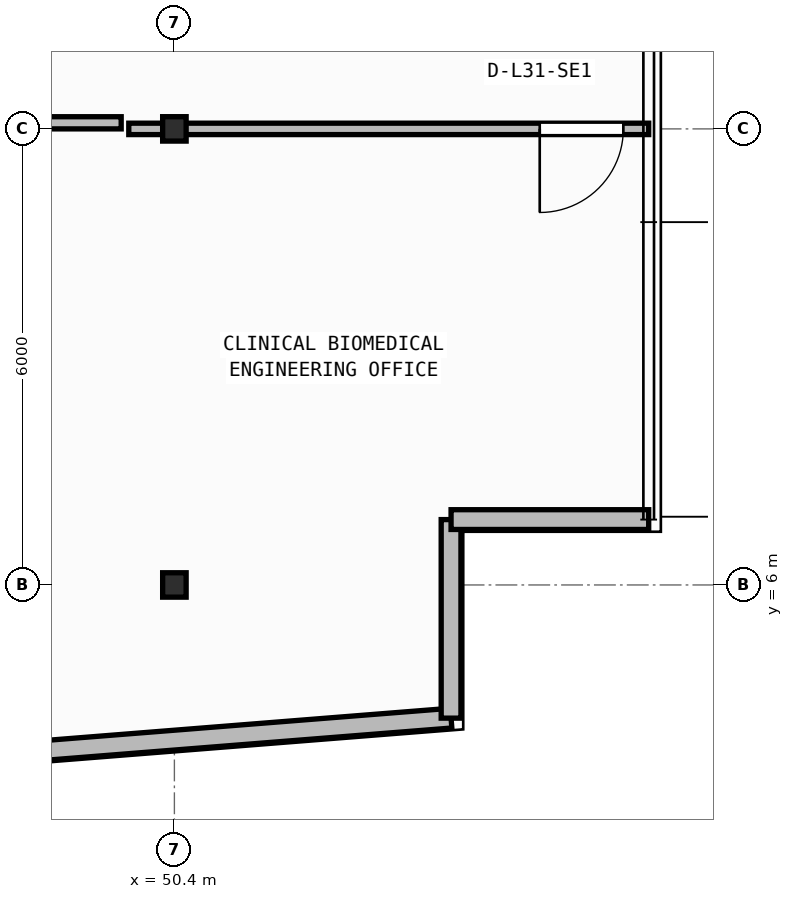
"""IFC4 building model, lengths in metres.
Left out: names, types, materials, properties, quantities, classifications, styles, units other than length and angle.
Written with IfcOpenShell. Run it as: python <this file> out.ifc"""

import sys

from ifc_helpers import new_model, si_unit, direction, frame, frame_2d, origin, origin_2d, place, context, subcontext, project, spatial, rectangle, i_section, extrude, element, fill, save


model = new_model("IFC4")
c1 = context("Model", 3, precision=1e-05, world=origin(), true_north=direction((0.0, 1.0)))
c2 = subcontext(c1, "Body", "Model", "MODEL_VIEW")
j1 = project(units=[si_unit("LENGTHUNIT", "METRE"), si_unit("PLANEANGLEUNIT", "RADIAN")], contexts=[c1])
p1 = place(None, origin())
s1 = spatial("IfcSite", under=j1, at=p1, CompositionType="ELEMENT")
p2 = place(p1, origin())
s2 = spatial("IfcBuilding", under=s1, at=p2, CompositionType="ELEMENT")
p3 = place(p2, frame((0.0, 0.0, 127.05)))
s3 = spatial("IfcBuildingStorey", under=s2, at=p3, CompositionType="ELEMENT", Elevation=127.05)
for number, where, z_axis, x_axis in (
    (1, (50.4, 6.0, 0.0), (0.0, 0.0, 1.0), (1.0, 0.0, 0.0)),
    (2, (50.4, 12.0, 0.0), (0.0, 0.0, 1.0), (1.0, 0.0, 0.0)),
):
    element("IfcColumn", number, at=place(p3, frame(where, z_axis=z_axis, x_axis=x_axis)), inside=s3, PredefinedType="COLUMN", context=c2, shape_type="SweptSolid", body=[
        extrude(i_section(OverallWidth=0.309, OverallDepth=0.321, WebThickness=0.014, FlangeThickness=0.022, FilletRadius=0.017, at=origin_2d()), origin(), (0.0, 0.0, 1.0), 3.95),
    ])
p4 = place(p3, frame((2.76, 0.173, 0.0), z_axis=(0.0, 0.0, 1.0), x_axis=(0.996857931723, 0.079210251617, 0.0)))
e3 = element("IfcWall", 3, at=p4, inside=s3, PredefinedType="STANDARD", context=c2, shape_type="SweptSolid", body=[
    extrude(rectangle(XDim=51.442, YDim=0.26, at=frame_2d((25.721, 0.0))), origin(), (0.0, 0.0, 1.0), 3.71),
])
p5 = place(p4, frame((24.521, 0.0, 0.9)))
e4 = element("IfcOpeningElement", 4, at=p5, cuts=e3, PredefinedType="OPENING", context=c2, shape_type="SweptSolid", body=[
    extrude(rectangle(XDim=2.4, YDim=1.65, at=frame_2d((1.2, 0.825))), frame((0.0, 0.14, 0.0), z_axis=(0.0, -1.0, 0.0), x_axis=(1.0, 0.0, 0.0)), (0.0, 0.0, 1.0), 0.28),
])
p6 = place(p3, frame((54.04, 4.248, 0.0), z_axis=(0.0, 0.0, 1.0), x_axis=(0.0, 1.0, 0.0)))
e5 = element("IfcWall", 5, at=p6, inside=s3, PredefinedType="STANDARD", context=c2, shape_type="SweptSolid", body=[
    extrude(rectangle(XDim=2.612, YDim=0.26, at=frame_2d((1.306, 0.0))), origin(), (0.0, 0.0, 1.0), 3.71),
])
p7 = place(p3, frame((54.04, 6.86, 0.0), z_axis=(0.0, 0.0, 1.0), x_axis=(1.0, 0.0, 0.0)))
e6 = element("IfcWall", 6, at=p7, inside=s3, PredefinedType="STANDARD", context=c2, shape_type="SweptSolid", body=[
    extrude(rectangle(XDim=2.6, YDim=0.26, at=frame_2d((1.3, 0.0))), origin(), (0.0, 0.0, 1.0), 3.71),
])
p8 = place(p3, frame((56.64, 12.0, 0.0), z_axis=(0.0, 0.0, 1.0), x_axis=(-1.0, 0.0, 0.0)))
e7 = element("IfcWall", 7, at=p8, inside=s3, PredefinedType="PARTITIONING", context=c2, shape_type="SweptSolid", body=[
    extrude(rectangle(XDim=6.84, YDim=0.15, at=frame_2d((3.42, 0.0))), origin(), (0.0, 0.0, 1.0), 3.083),
])
p9 = place(p8, frame((0.333, 0.0, 0.0)))
e8 = element("IfcOpeningElement", 8, at=p9, cuts=e7, PredefinedType="OPENING", context=c2, shape_type="SweptSolid", body=[
    extrude(rectangle(XDim=1.1, YDim=2.1, at=frame_2d((0.55, 1.05))), frame((0.0, 0.085, 0.0), z_axis=(0.0, -1.0, 0.0), x_axis=(1.0, 0.0, 0.0)), (0.0, 0.0, 1.0), 0.17),
])
p10 = place(p3, frame((46.689, 12.08, 0.0), z_axis=(0.0, 0.0, 1.0), x_axis=(1.0, 0.0, 0.0)))
e9 = element("IfcWall", 9, at=p10, inside=s3, PredefinedType="PARTITIONING", context=c2, shape_type="SweptSolid", body=[
    extrude(rectangle(XDim=3.011, YDim=0.16, at=frame_2d((1.505, 0.0))), origin(), (0.0, 0.0, 1.0), 3.083),
])
p11 = place(p9, origin())
e10 = element("IfcDoor", 10, at=p11, inside=s3, OperationType="SINGLE_SWING_RIGHT", PredefinedType="DOOR", context=c2, shape_type="SweptSolid", body=[
    extrude(rectangle(XDim=1.1, YDim=2.1, at=frame_2d((0.55, 1.05))), frame((0.0, 0.025, 0.0), z_axis=(0.0, -1.0, 0.0), x_axis=(1.0, 0.0, 0.0)), (0.0, 0.0, 1.0), 0.05),
])
fill(e8, e10)
save(model, sys.argv[1])
